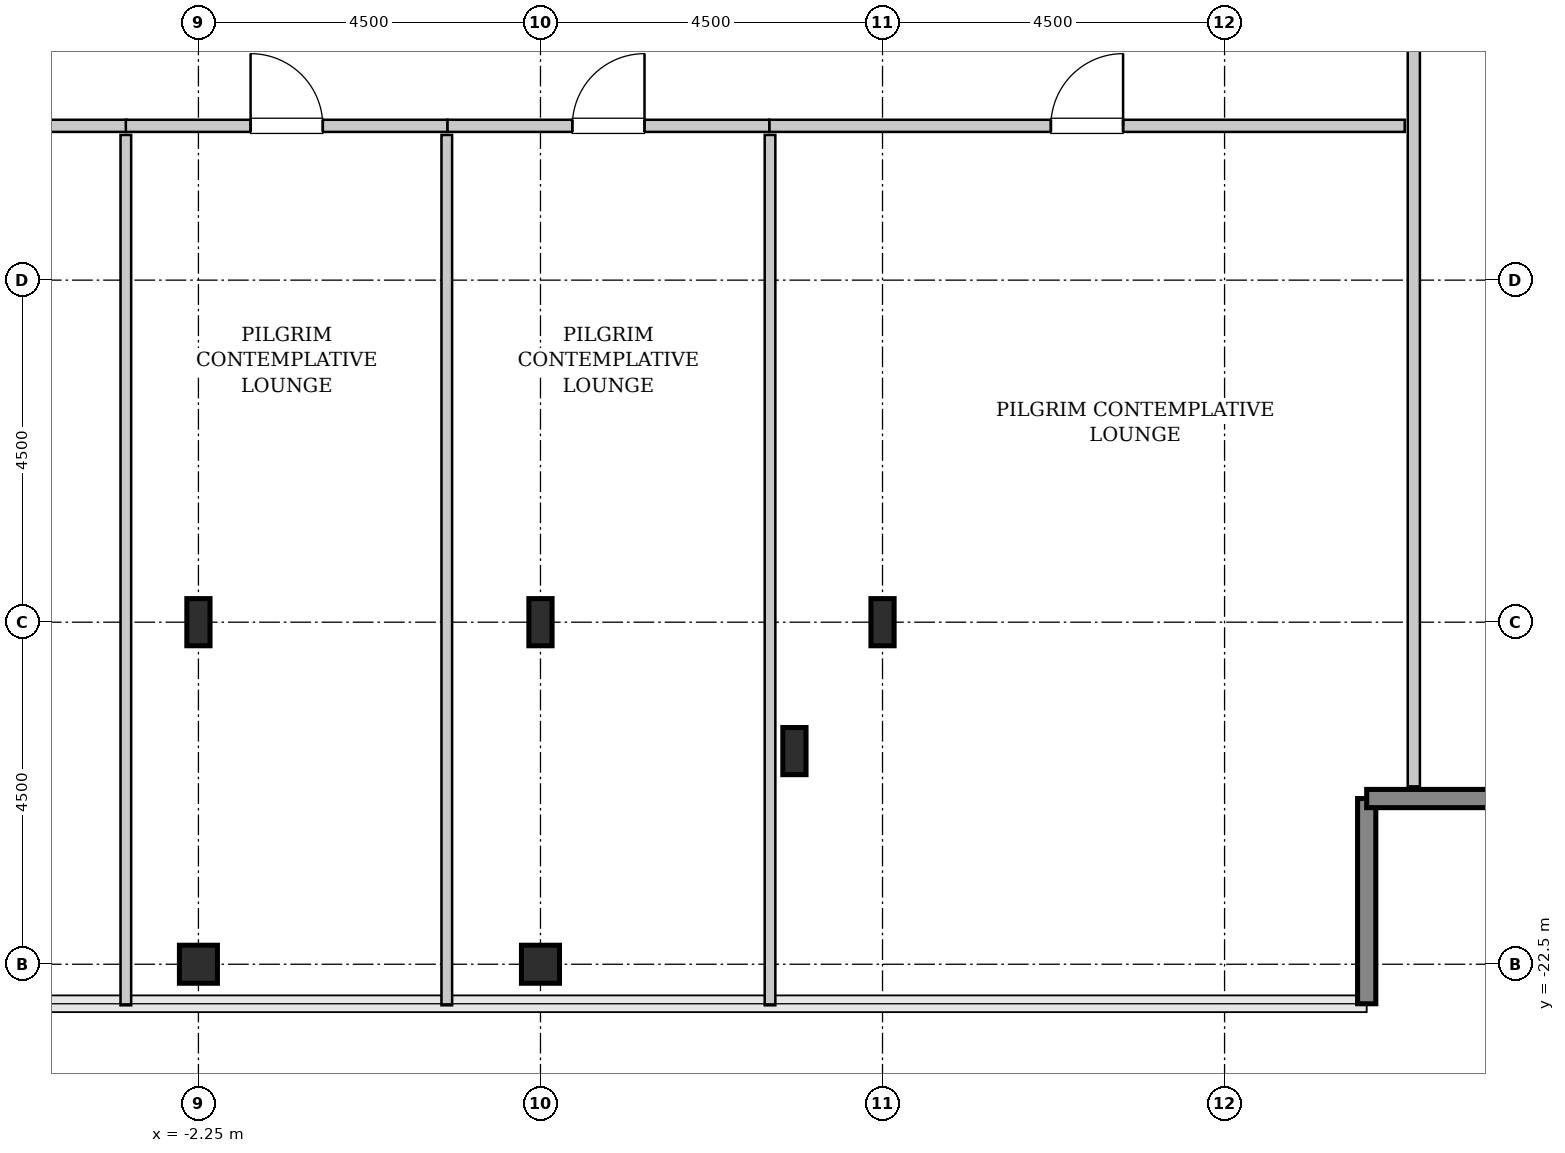
"""IFC4 building model, lengths in metres.
Left out: names, types, materials, properties, quantities, classifications, styles, units other than length and angle.
Written with IfcOpenShell. Run it as: python <this file> out.ifc"""

import sys

from ifc_helpers import new_model, si_unit, direction, frame, frame_2d, origin, origin_2d, place, context, subcontext, project, spatial, rectangle, hollow_rectangle, i_section, extrude, source, transform, mapped, element, fill, save


model = new_model("IFC4")
c1 = context("Model", 3, precision=1e-05, world=origin(), true_north=direction((0.0, 1.0)))
c2 = subcontext(c1, "Body", "Model", "MODEL_VIEW")
j1 = project(units=[si_unit("LENGTHUNIT", "METRE"), si_unit("PLANEANGLEUNIT", "RADIAN")], contexts=[c1])
p1 = place(None, origin())
s1 = spatial("IfcSite", under=j1, at=p1, CompositionType="ELEMENT")
p2 = place(p1, origin())
s2 = spatial("IfcBuilding", under=s1, at=p2, CompositionType="ELEMENT")
p3 = place(p2, frame((0.0, 0.0, 322.4)))
s3 = spatial("IfcBuildingStorey", under=s2, at=p3, CompositionType="ELEMENT", Elevation=322.4)
m1 = source(origin(), c2, "Body", "SweptSolid", [
    extrude(hollow_rectangle(XDim=0.5, YDim=0.5, WallThickness=0.025, InnerFilletRadius=0.025, OuterFilletRadius=0.05, at=origin_2d()), origin(), (0.0, 0.0, 1.0), 3.8),
])
p4 = place(p3, frame((-2.25, -22.5, 0.0), z_axis=(0.0, 0.0, 1.0), x_axis=(1.0, 0.0, 0.0)))
e1 = element("IfcColumn", 1, at=p4, inside=s3, PredefinedType="COLUMN", context=c2, shape_type="MappedRepresentation", body=[
    mapped(m1, transform((0.0, 0.0, 0.0), x_axis=(1.0, 0.0, 0.0), y_axis=(0.0, 1.0, 0.0), z_axis=(0.0, 0.0, 1.0), scale=1.0)),
])
m2 = source(origin(), c2, "Body", "SweptSolid", [
    extrude(i_section(OverallWidth=0.305, OverallDepth=0.62, WebThickness=0.021, FlangeThickness=0.04, FilletRadius=0.027, at=origin_2d()), origin(), (0.0, 0.0, 1.0), 3.8),
])
p5 = place(p3, frame((-2.25, -18.0, 0.0), z_axis=(0.0, 0.0, 1.0), x_axis=(1.0, 0.0, 0.0)))
e2 = element("IfcColumn", 2, at=p5, inside=s3, PredefinedType="COLUMN", context=c2, shape_type="MappedRepresentation", body=[
    mapped(m2, transform((0.0, 0.0, 0.0), x_axis=(1.0, 0.0, 0.0), y_axis=(0.0, 1.0, 0.0), z_axis=(0.0, 0.0, 1.0), scale=1.0)),
])
p6 = place(p3, frame((2.25, -22.5, 0.0), z_axis=(0.0, 0.0, 1.0), x_axis=(1.0, 0.0, 0.0)))
e3 = element("IfcColumn", 3, at=p6, inside=s3, PredefinedType="COLUMN", context=c2, shape_type="MappedRepresentation", body=[
    mapped(m1, transform((0.0, 0.0, 0.0), x_axis=(1.0, 0.0, 0.0), y_axis=(0.0, 1.0, 0.0), z_axis=(0.0, 0.0, 1.0), scale=1.0)),
])
for number, where, z_axis, x_axis in (
    (4, (2.25, -18.0, 0.0), (0.0, 0.0, 1.0), (1.0, 0.0, 0.0)),
    (5, (5.591, -19.696, 0.0), (0.0, 0.0, 1.0), (1.0, 0.0, 0.0)),
    (6, (6.75, -18.0, 0.0), (0.0, 0.0, 1.0), (1.0, 0.0, 0.0)),
):
    element("IfcColumn", number, at=place(p3, frame(where, z_axis=z_axis, x_axis=x_axis)), inside=s3, PredefinedType="COLUMN", context=c2, shape_type="MappedRepresentation", body=[
        mapped(m2, transform((0.0, 0.0, 0.0), x_axis=(1.0, 0.0, 0.0), y_axis=(0.0, 1.0, 0.0), z_axis=(0.0, 0.0, 1.0), scale=1.0)),
    ])
m3 = source(origin(), c2, "Body", "SweptSolid", [
    extrude(rectangle(XDim=2.7, YDim=0.24, at=frame_2d((1.35, 0.0))), origin(), (0.0, 0.0, 1.0), 3.55),
])
for number, where, z_axis, x_axis in (
    (7, (13.12, -23.02, 0.0), (0.0, 0.0, 1.0), (0.0, 1.0, 0.0)),
    (8, (13.12, -20.32, 0.0), (0.0, 0.0, 1.0), (1.0, 0.0, 0.0)),
):
    element("IfcWall", number, at=place(p3, frame(where, z_axis=z_axis, x_axis=x_axis)), inside=s3, PredefinedType="SHEAR", context=c2, shape_type="MappedRepresentation", body=[
        mapped(m3, transform((0.0, 0.0, 0.0), x_axis=(1.0, 0.0, 0.0), y_axis=(0.0, 1.0, 0.0), z_axis=(0.0, 0.0, 1.0), scale=1.0)),
    ])
m4 = source(origin(), c2, "Body", "SweptSolid", [
    extrude(rectangle(XDim=12.365, YDim=0.16, at=frame_2d((6.183, 0.0))), origin(), (0.0, 0.0, 1.0), 3.535),
])
p7 = place(p3, frame((13.74, -20.16, 0.0), z_axis=(0.0, 0.0, 1.0), x_axis=(0.0, 1.0, 0.0)))
e9 = element("IfcWall", 9, at=p7, inside=s3, PredefinedType="PARTITIONING", context=c2, shape_type="MappedRepresentation", body=[
    mapped(m4, transform((0.0, 0.0, 0.0), x_axis=(1.0, 0.0, 0.0), y_axis=(0.0, 1.0, 0.0), z_axis=(0.0, 0.0, 1.0), scale=1.0)),
])
p8 = place(p7, frame((10.032, 0.0, 0.0)))
e10 = element("IfcOpeningElement", 10, at=p8, cuts=e9, PredefinedType="OPENING", context=c2, shape_type="SweptSolid", body=[
    extrude(rectangle(XDim=0.95, YDim=2.1, at=frame_2d((0.475, 1.05))), frame((0.0, 0.09, 0.0), z_axis=(0.0, -1.0, 0.0), x_axis=(1.0, 0.0, 0.0)), (0.0, 0.0, 1.0), 0.18),
])
m5 = source(origin(), c2, "Body", "SweptSolid", [
    extrude(rectangle(XDim=5.265, YDim=0.16, at=frame_2d((2.632, 0.0))), origin(), (0.0, 0.0, 1.0), 3.535),
])
p9 = place(p3, frame((-8.46, -11.47, 0.0), z_axis=(0.0, 0.0, 1.0), x_axis=(1.0, 0.0, 0.0)))
e11 = element("IfcWall", 11, at=p9, inside=s3, PredefinedType="PARTITIONING", context=c2, shape_type="MappedRepresentation", body=[
    mapped(m5, transform((0.0, 0.0, 0.0), x_axis=(1.0, 0.0, 0.0), y_axis=(0.0, 1.0, 0.0), z_axis=(0.0, 0.0, 1.0), scale=1.0)),
])
p10 = place(p9, frame((2.157, 0.0, 0.0)))
e12 = element("IfcOpeningElement", 12, at=p10, cuts=e11, PredefinedType="OPENING", context=c2, shape_type="SweptSolid", body=[
    extrude(rectangle(XDim=0.95, YDim=2.1, at=frame_2d((0.475, 1.05))), frame((0.0, 0.09, 0.0), z_axis=(0.0, -1.0, 0.0), x_axis=(1.0, 0.0, 0.0)), (0.0, 0.0, 1.0), 0.18),
])
m6 = source(origin(), c2, "Body", "SweptSolid", [
    extrude(rectangle(XDim=11.45, YDim=0.14, at=frame_2d((5.725, 0.0))), origin(), (0.0, 0.0, 1.0), 3.535),
])
p11 = place(p3, frame((-3.205, -23.04, 0.0), z_axis=(0.0, 0.0, 1.0), x_axis=(0.0, 1.0, 0.0)))
e13 = element("IfcWall", 13, at=p11, inside=s3, PredefinedType="PARTITIONING", context=c2, shape_type="MappedRepresentation", body=[
    mapped(m6, transform((0.0, 0.0, 0.0), x_axis=(1.0, 0.0, 0.0), y_axis=(0.0, 1.0, 0.0), z_axis=(0.0, 0.0, 1.0), scale=1.0)),
])
m7 = source(origin(), c2, "Body", "SweptSolid", [
    extrude(rectangle(XDim=8.36, YDim=0.16, at=frame_2d((4.18, 0.0))), origin(), (0.0, 0.0, 1.0), 3.535),
])
p12 = place(p3, frame((5.26, -11.47, 0.0), z_axis=(0.0, 0.0, 1.0), x_axis=(1.0, 0.0, 0.0)))
e14 = element("IfcWall", 14, at=p12, inside=s3, PredefinedType="PARTITIONING", context=c2, shape_type="MappedRepresentation", body=[
    mapped(m7, transform((0.0, 0.0, 0.0), x_axis=(1.0, 0.0, 0.0), y_axis=(0.0, 1.0, 0.0), z_axis=(0.0, 0.0, 1.0), scale=1.0)),
])
p13 = place(p12, frame((3.705, 0.0, 0.0)))
e15 = element("IfcOpeningElement", 15, at=p13, cuts=e14, PredefinedType="OPENING", context=c2, shape_type="SweptSolid", body=[
    extrude(rectangle(XDim=0.95, YDim=2.1, at=frame_2d((0.475, 1.05))), frame((0.0, 0.09, 0.0), z_axis=(0.0, -1.0, 0.0), x_axis=(1.0, 0.0, 0.0)), (0.0, 0.0, 1.0), 0.18),
])
p14 = place(p3, frame((5.27, -23.04, 0.0), z_axis=(0.0, 0.0, 1.0), x_axis=(0.0, 1.0, 0.0)))
e16 = element("IfcWall", 16, at=p14, inside=s3, PredefinedType="PARTITIONING", context=c2, shape_type="MappedRepresentation", body=[
    mapped(m6, transform((0.0, 0.0, 0.0), x_axis=(1.0, 0.0, 0.0), y_axis=(0.0, 1.0, 0.0), z_axis=(0.0, 0.0, 1.0), scale=1.0)),
])
m8 = source(origin(), c2, "Body", "SweptSolid", [
    extrude(rectangle(XDim=4.233, YDim=0.16, at=frame_2d((2.116, 0.0))), origin(), (0.0, 0.0, 1.0), 3.535),
])
p15 = place(p3, frame((-3.205, -11.47, 0.0), z_axis=(0.0, 0.0, 1.0), x_axis=(1.0, 0.0, 0.0)))
e17 = element("IfcWall", 17, at=p15, inside=s3, PredefinedType="PARTITIONING", context=c2, shape_type="MappedRepresentation", body=[
    mapped(m8, transform((0.0, 0.0, 0.0), x_axis=(1.0, 0.0, 0.0), y_axis=(0.0, 1.0, 0.0), z_axis=(0.0, 0.0, 1.0), scale=1.0)),
])
p16 = place(p15, frame((1.641, 0.0, 0.0)))
e18 = element("IfcOpeningElement", 18, at=p16, cuts=e17, PredefinedType="OPENING", context=c2, shape_type="SweptSolid", body=[
    extrude(rectangle(XDim=0.95, YDim=2.1, at=frame_2d((0.475, 1.05))), frame((0.0, 0.09, 0.0), z_axis=(0.0, -1.0, 0.0), x_axis=(1.0, 0.0, 0.0)), (0.0, 0.0, 1.0), 0.18),
])
p17 = place(p3, frame((1.018, -23.04, 0.0), z_axis=(0.0, 0.0, 1.0), x_axis=(0.0, 1.0, 0.0)))
e19 = element("IfcWall", 19, at=p17, inside=s3, PredefinedType="PARTITIONING", context=c2, shape_type="MappedRepresentation", body=[
    mapped(m6, transform((0.0, 0.0, 0.0), x_axis=(1.0, 0.0, 0.0), y_axis=(0.0, 1.0, 0.0), z_axis=(0.0, 0.0, 1.0), scale=1.0)),
])
m9 = source(origin(), c2, "Body", "SweptSolid", [
    extrude(rectangle(XDim=4.232, YDim=0.16, at=frame_2d((2.116, 0.0))), origin(), (0.0, 0.0, 1.0), 3.535),
])
p18 = place(p3, frame((1.028, -11.47, 0.0), z_axis=(0.0, 0.0, 1.0), x_axis=(1.0, 0.0, 0.0)))
e20 = element("IfcWall", 20, at=p18, inside=s3, PredefinedType="PARTITIONING", context=c2, shape_type="MappedRepresentation", body=[
    mapped(m9, transform((0.0, 0.0, 0.0), x_axis=(1.0, 0.0, 0.0), y_axis=(0.0, 1.0, 0.0), z_axis=(0.0, 0.0, 1.0), scale=1.0)),
])
p19 = place(p18, frame((1.641, 0.0, 0.0)))
e21 = element("IfcOpeningElement", 21, at=p19, cuts=e20, PredefinedType="OPENING", context=c2, shape_type="SweptSolid", body=[
    extrude(rectangle(XDim=0.95, YDim=2.1, at=frame_2d((0.475, 1.05))), frame((0.0, 0.09, 0.0), z_axis=(0.0, -1.0, 0.0), x_axis=(1.0, 0.0, 0.0)), (0.0, 0.0, 1.0), 0.18),
])
m10 = source(origin(), c2, "Body", "SweptSolid", [
    extrude(rectangle(XDim=0.95, YDim=2.1, at=frame_2d((0.475, 1.05))), frame((0.0, 0.025, 0.0), z_axis=(0.0, -1.0, 0.0), x_axis=(1.0, 0.0, 0.0)), (0.0, 0.0, 1.0), 0.05),
])
p20 = place(p13, origin())
e22 = element("IfcDoor", 22, at=p20, inside=s3, OperationType="SINGLE_SWING_RIGHT", PredefinedType="DOOR", context=c2, shape_type="MappedRepresentation", body=[
    mapped(m10, transform((0.0, 0.0, 0.0), x_axis=(1.0, 0.0, 0.0), y_axis=(0.0, 1.0, 0.0), z_axis=(0.0, 0.0, 1.0), scale=1.0)),
])
fill(e15, e22)
p21 = place(p16, origin())
e23 = element("IfcDoor", 23, at=p21, inside=s3, OperationType="SINGLE_SWING_LEFT", PredefinedType="DOOR", context=c2, shape_type="MappedRepresentation", body=[
    mapped(m10, transform((0.0, 0.0, 0.0), x_axis=(1.0, 0.0, 0.0), y_axis=(0.0, 1.0, 0.0), z_axis=(0.0, 0.0, 1.0), scale=1.0)),
])
fill(e18, e23)
p22 = place(p19, origin())
e24 = element("IfcDoor", 24, at=p22, inside=s3, OperationType="SINGLE_SWING_RIGHT", PredefinedType="DOOR", context=c2, shape_type="MappedRepresentation", body=[
    mapped(m10, transform((0.0, 0.0, 0.0), x_axis=(1.0, 0.0, 0.0), y_axis=(0.0, 1.0, 0.0), z_axis=(0.0, 0.0, 1.0), scale=1.0)),
])
fill(e21, e24)
save(model, sys.argv[1])
